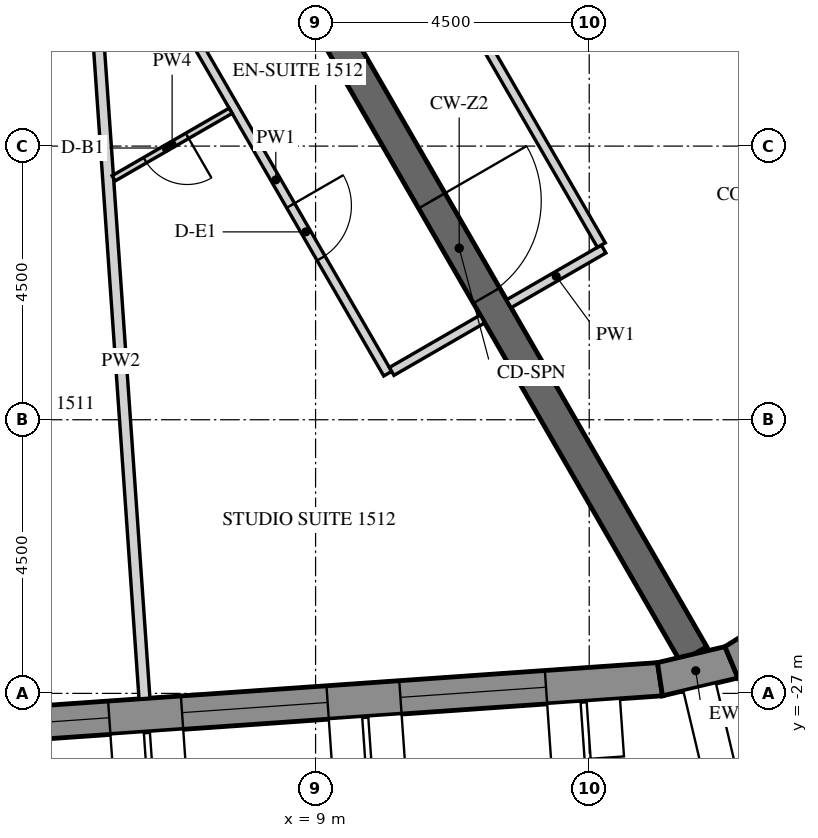
"""IFC4 building model, lengths in metres.
Left out: names, types, materials, properties, quantities, classifications, styles, units other than length and angle.
Written with IfcOpenShell. Run it as: python <this file> out.ifc"""

import sys

from ifc_helpers import new_model, si_unit, direction, frame, frame_2d, origin, place, context, subcontext, project, spatial, polyline, rectangle, outline, extrude, element, fill, save


model = new_model("IFC4")
c1 = context("Model", 3, precision=1e-05, world=origin(), true_north=direction((0.0, 1.0)))
c2 = subcontext(c1, "Body", "Model", "MODEL_VIEW")
j1 = project(units=[si_unit("LENGTHUNIT", "METRE"), si_unit("PLANEANGLEUNIT", "RADIAN")], contexts=[c1])
p1 = place(None, origin())
s1 = spatial("IfcSite", under=j1, at=p1, CompositionType="ELEMENT")
p2 = place(p1, origin())
s2 = spatial("IfcBuilding", under=s1, at=p2, CompositionType="ELEMENT")
p3 = place(p2, frame((0.0, 0.0, 195.6)))
s3 = spatial("IfcBuildingStorey", under=s2, at=p3, CompositionType="ELEMENT", Elevation=195.6)
p4 = place(p3, frame((-13.026, -28.704, -0.15), z_axis=(0.0, 0.0, 1.0), x_axis=(0.99756406806, 0.069756219185, 0.0)))
e1 = element("IfcWall", 1, at=p4, inside=s3, PredefinedType="SOLIDWALL", context=c2, shape_type="SweptSolid", body=[
    extrude(outline(polyline([(-0.026, -0.275), (27.78, -0.275), (27.735, 0.275), (0.026, 0.275), (-0.026, -0.275)])), origin(), (0.0, 0.0, 1.0), 3.9),
])
p5 = place(p4, frame((1.879, 0.0, 1.05)))
e2 = element("IfcOpeningElement", 2, at=p5, cuts=e1, PredefinedType="OPENING", context=c2, shape_type="SweptSolid", body=[
    extrude(rectangle(XDim=2.4, YDim=2.4, at=frame_2d((1.2, 1.2))), frame((0.0, 0.285, 0.0), z_axis=(0.0, -1.0, 0.0), x_axis=(1.0, 0.0, 0.0)), (0.0, 0.0, 1.0), 0.57),
])
p6 = place(p4, frame((5.479, 0.0, 1.05)))
e3 = element("IfcOpeningElement", 3, at=p6, cuts=e1, PredefinedType="OPENING", context=c2, shape_type="SweptSolid", body=[
    extrude(rectangle(XDim=2.4, YDim=2.4, at=frame_2d((1.2, 1.2))), frame((0.0, 0.285, 0.0), z_axis=(0.0, -1.0, 0.0), x_axis=(1.0, 0.0, 0.0)), (0.0, 0.0, 1.0), 0.57),
])
p7 = place(p4, frame((9.079, 0.0, 1.05)))
e4 = element("IfcOpeningElement", 4, at=p7, cuts=e1, PredefinedType="OPENING", context=c2, shape_type="SweptSolid", body=[
    extrude(rectangle(XDim=2.4, YDim=2.4, at=frame_2d((1.2, 1.2))), frame((0.0, 0.285, 0.0), z_axis=(0.0, -1.0, 0.0), x_axis=(1.0, 0.0, 0.0)), (0.0, 0.0, 1.0), 0.57),
])
p8 = place(p4, frame((12.679, 0.0, 1.05)))
e5 = element("IfcOpeningElement", 5, at=p8, cuts=e1, PredefinedType="OPENING", context=c2, shape_type="SweptSolid", body=[
    extrude(rectangle(XDim=2.4, YDim=2.4, at=frame_2d((1.2, 1.2))), frame((0.0, 0.285, 0.0), z_axis=(0.0, -1.0, 0.0), x_axis=(1.0, 0.0, 0.0)), (0.0, 0.0, 1.0), 0.57),
])
p9 = place(p4, frame((16.279, 0.0, 1.05)))
e6 = element("IfcOpeningElement", 6, at=p9, cuts=e1, PredefinedType="OPENING", context=c2, shape_type="SweptSolid", body=[
    extrude(rectangle(XDim=2.4, YDim=2.4, at=frame_2d((1.2, 1.2))), frame((0.0, 0.285, 0.0), z_axis=(0.0, -1.0, 0.0), x_axis=(1.0, 0.0, 0.0)), (0.0, 0.0, 1.0), 0.57),
])
p10 = place(p4, frame((19.879, 0.0, 1.05)))
e7 = element("IfcOpeningElement", 7, at=p10, cuts=e1, PredefinedType="OPENING", context=c2, shape_type="SweptSolid", body=[
    extrude(rectangle(XDim=2.4, YDim=2.4, at=frame_2d((1.2, 1.2))), frame((0.0, 0.285, 0.0), z_axis=(0.0, -1.0, 0.0), x_axis=(1.0, 0.0, 0.0)), (0.0, 0.0, 1.0), 0.57),
])
p11 = place(p4, frame((23.479, 0.0, 1.05)))
e8 = element("IfcOpeningElement", 8, at=p11, cuts=e1, PredefinedType="OPENING", context=c2, shape_type="SweptSolid", body=[
    extrude(rectangle(XDim=2.4, YDim=2.4, at=frame_2d((1.2, 1.2))), frame((0.0, 0.285, 0.0), z_axis=(0.0, -1.0, 0.0), x_axis=(1.0, 0.0, 0.0)), (0.0, 0.0, 1.0), 0.57),
])
p12 = place(p3, frame((14.664, -26.767, -0.15), z_axis=(0.0, 0.0, 1.0), x_axis=(0.973063591128, 0.230536868247, 0.0)))
e9 = element("IfcWall", 9, at=p12, inside=s3, PredefinedType="SOLIDWALL", context=c2, shape_type="SweptSolid", body=[
    extrude(outline(polyline([(-0.022, -0.275), (1.253, -0.275), (1.163, 0.275), (0.022, 0.275), (-0.022, -0.275)])), origin(), (0.0, 0.0, 1.0), 3.9),
])
p13 = place(p3, frame((15.84, -26.489, -0.15), z_axis=(0.0, 0.0, 1.0), x_axis=(0.848009655012, 0.52998077796, 0.0)))
e10 = element("IfcWall", 10, at=p13, inside=s3, PredefinedType="SOLIDWALL", context=c2, shape_type="SweptSolid", body=[
    extrude(outline(polyline([(-0.045, -0.275), (1.253, -0.275), (1.163, 0.275), (0.045, 0.275), (-0.045, -0.275)])), origin(), (0.0, 0.0, 1.0), 3.9),
])
p14 = place(p3, frame((7.506, -13.0, -0.15), z_axis=(0.0, 0.0, 1.0), x_axis=(0.499988271576, -0.866032175087, 0.0)))
e11 = element("IfcWall", 11, at=p14, inside=s3, PredefinedType="SHEAR", context=c2, shape_type="SweptSolid", body=[
    extrude(rectangle(XDim=15.424, YDim=0.5, at=frame_2d((7.712, 0.0))), origin(), (0.0, 0.0, 1.0), 3.9),
])
p15 = place(p14, frame((6.812, 0.0, 0.15)))
e12 = element("IfcOpeningElement", 12, at=p15, cuts=e11, PredefinedType="OPENING", context=c2, shape_type="SweptSolid", body=[
    extrude(rectangle(XDim=1.8, YDim=2.4, at=frame_2d((0.9, 1.2))), frame((0.0, 0.26, 0.0), z_axis=(0.0, -1.0, 0.0), x_axis=(1.0, 0.0, 0.0)), (0.0, 0.0, 1.0), 0.52),
])
p16 = place(p3, frame((6.506, -15.368, 0.0), z_axis=(0.0, 0.0, 1.0), x_axis=(0.499995202058, -0.86602817386, 0.0)))
e13 = element("IfcWall", 13, at=p16, inside=s3, PredefinedType="PARTITIONING", context=c2, shape_type="SweptSolid", body=[
    extrude(rectangle(XDim=7.361, YDim=0.15, at=frame_2d((3.68, 0.0))), origin(), (0.0, 0.0, 1.0), 2.988),
])
p17 = place(p16, frame((4.168, 0.0, 0.0)))
e14 = element("IfcOpeningElement", 14, at=p17, cuts=e13, PredefinedType="OPENING", context=c2, shape_type="SweptSolid", body=[
    extrude(rectangle(XDim=1.0, YDim=2.1, at=frame_2d((0.5, 1.05))), frame((0.0, 0.085, 0.0), z_axis=(0.0, -1.0, 0.0), x_axis=(1.0, 0.0, 0.0)), (0.0, 0.0, 1.0), 0.17),
])
p18 = place(p3, frame((10.251, -21.705, 0.0), z_axis=(0.0, 0.0, 1.0), x_axis=(0.866013532718, 0.500020560727, 0.0)))
e15 = element("IfcWall", 15, at=p18, inside=s3, PredefinedType="PARTITIONING", context=c2, shape_type="SweptSolid", body=[
    extrude(rectangle(XDim=1.725, YDim=0.15, at=frame_2d((0.863, 0.0))), origin(), (0.0, 0.0, 1.0), 2.988),
])
p19 = place(p3, frame((12.178, -20.593, 0.0), z_axis=(0.0, 0.0, 1.0), x_axis=(0.866047807691, 0.499961193289, 0.0)))
e16 = element("IfcWall", 16, at=p19, inside=s3, PredefinedType="PARTITIONING", context=c2, shape_type="SweptSolid", body=[
    extrude(rectangle(XDim=1.8, YDim=0.15, at=frame_2d((0.9, 0.0))), origin(), (0.0, 0.0, 1.0), 2.988),
])
p20 = place(p3, frame((13.699, -19.628, 0.0), z_axis=(0.0, 0.0, 1.0), x_axis=(-0.499993780622, 0.866028994514, 0.0)))
e17 = element("IfcWall", 17, at=p20, inside=s3, PredefinedType="PARTITIONING", context=c2, shape_type="SweptSolid", body=[
    extrude(rectangle(XDim=7.711, YDim=0.15, at=frame_2d((3.855, 0.0))), origin(), (0.0, 0.0, 1.0), 2.988),
])
p21 = place(p3, frame((6.187, -27.084, 0.0), z_axis=(0.0, 0.0, 1.0), x_axis=(-0.069758943489, 0.997563877555, 0.0)))
e18 = element("IfcWall", 18, at=p21, inside=s3, PredefinedType="PARTITIONING", context=c2, shape_type="SweptSolid", body=[
    extrude(rectangle(XDim=11.112, YDim=0.18, at=frame_2d((5.556, 0.0))), origin(), (0.0, 0.0, 1.0), 2.988),
])
p22 = place(p3, frame((7.603, -17.419, 0.0), z_axis=(0.0, 0.0, 1.0), x_axis=(-0.866064858854, -0.499931655587, 0.0)))
e19 = element("IfcWall", 19, at=p22, inside=s3, PredefinedType="PARTITIONING", context=c2, shape_type="SweptSolid", body=[
    extrude(rectangle(XDim=2.222, YDim=0.1, at=frame_2d((1.111, 0.0))), origin(), (0.0, 0.0, 1.0), 2.988),
])
p23 = place(p22, frame((0.825, 0.0, 0.0)))
e20 = element("IfcOpeningElement", 20, at=p23, cuts=e19, PredefinedType="OPENING", context=c2, shape_type="SweptSolid", body=[
    extrude(rectangle(XDim=0.8, YDim=2.1, at=frame_2d((0.4, 1.05))), frame((0.0, 0.06, 0.0), z_axis=(0.0, -1.0, 0.0), x_axis=(1.0, 0.0, 0.0)), (0.0, 0.0, 1.0), 0.12),
])
p24 = place(p9, frame((0.0, 0.205, 0.0)))
e21 = element("IfcWindow", 21, at=p24, inside=s3, PartitioningType="DOUBLE_PANEL_VERTICAL", PredefinedType="WINDOW", context=c2, shape_type="SweptSolid", body=[
    extrude(rectangle(XDim=2.4, YDim=2.4, at=frame_2d((1.2, 1.2))), frame((0.0, 0.03, 0.0), z_axis=(0.0, -1.0, 0.0), x_axis=(1.0, 0.0, 0.0)), (0.0, 0.0, 1.0), 0.06),
])
fill(e6, e21)
p25 = place(p10, frame((0.0, 0.205, 0.0)))
e22 = element("IfcWindow", 22, at=p25, inside=s3, PartitioningType="DOUBLE_PANEL_VERTICAL", PredefinedType="WINDOW", context=c2, shape_type="SweptSolid", body=[
    extrude(rectangle(XDim=2.4, YDim=2.4, at=frame_2d((1.2, 1.2))), frame((0.0, 0.03, 0.0), z_axis=(0.0, -1.0, 0.0), x_axis=(1.0, 0.0, 0.0)), (0.0, 0.0, 1.0), 0.06),
])
fill(e7, e22)
p26 = place(p11, frame((0.0, 0.205, 0.0)))
e23 = element("IfcWindow", 23, at=p26, inside=s3, PartitioningType="DOUBLE_PANEL_VERTICAL", PredefinedType="WINDOW", context=c2, shape_type="SweptSolid", body=[
    extrude(rectangle(XDim=2.4, YDim=2.4, at=frame_2d((1.2, 1.2))), frame((0.0, 0.03, 0.0), z_axis=(0.0, -1.0, 0.0), x_axis=(1.0, 0.0, 0.0)), (0.0, 0.0, 1.0), 0.06),
])
fill(e8, e23)
p27 = place(p15, origin())
e24 = element("IfcDoor", 24, at=p27, inside=s3, OperationType="DOUBLE_DOOR_SINGLE_SWING", PredefinedType="DOOR", context=c2, shape_type="SweptSolid", body=[
    extrude(rectangle(XDim=1.8, YDim=2.4, at=frame_2d((0.9, 1.2))), frame((0.0, 0.025, 0.0), z_axis=(0.0, -1.0, 0.0), x_axis=(1.0, 0.0, 0.0)), (0.0, 0.0, 1.0), 0.05),
])
fill(e12, e24)
p28 = place(p17, origin())
e25 = element("IfcDoor", 25, at=p28, inside=s3, OperationType="SINGLE_SWING_RIGHT", PredefinedType="DOOR", context=c2, shape_type="SweptSolid", body=[
    extrude(rectangle(XDim=1.0, YDim=2.1, at=frame_2d((0.5, 1.05))), frame((0.0, 0.025, 0.0), z_axis=(0.0, -1.0, 0.0), x_axis=(1.0, 0.0, 0.0)), (0.0, 0.0, 1.0), 0.05),
])
fill(e14, e25)
p29 = place(p23, origin())
e26 = element("IfcDoor", 26, at=p29, inside=s3, OperationType="SINGLE_SWING_LEFT", PredefinedType="DOOR", context=c2, shape_type="SweptSolid", body=[
    extrude(rectangle(XDim=0.8, YDim=2.1, at=frame_2d((0.4, 1.05))), frame((0.0, 0.025, 0.0), z_axis=(0.0, -1.0, 0.0), x_axis=(1.0, 0.0, 0.0)), (0.0, 0.0, 1.0), 0.05),
])
fill(e20, e26)
save(model, sys.argv[1])
